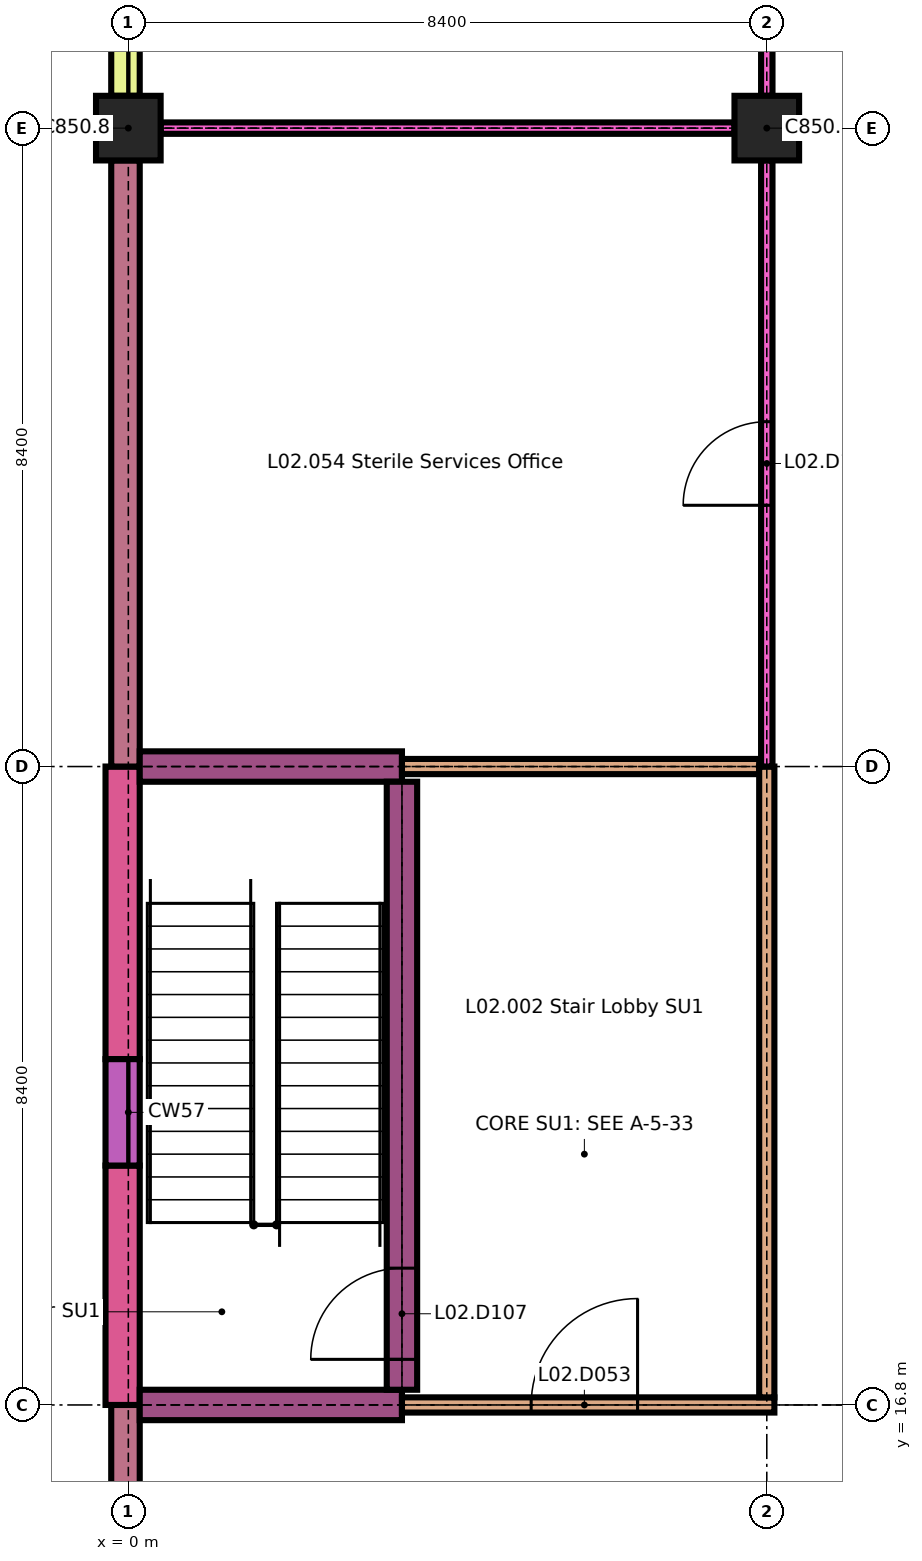
"""IFC4 building model, lengths in metres.
Left out: names, types, materials, properties, quantities, classifications, styles, units other than length and angle.
Written with IfcOpenShell. Run it as: python <this file> out.ifc"""

import sys

from ifc_helpers import new_model, si_unit, direction, frame, frame_2d, origin, origin_2d, place, context, subcontext, project, spatial, rectangle, extrude, element, fill, save


model = new_model("IFC4")
c1 = context("Model", 3, precision=1e-05, world=origin(), true_north=direction((0.0, 1.0)))
c2 = subcontext(c1, "Body", "Model", "MODEL_VIEW")
j1 = project(units=[si_unit("LENGTHUNIT", "METRE"), si_unit("PLANEANGLEUNIT", "RADIAN")], contexts=[c1])
p1 = place(None, origin())
s1 = spatial("IfcSite", under=j1, at=p1, CompositionType="ELEMENT")
p2 = place(p1, origin())
s2 = spatial("IfcBuilding", under=s1, at=p2, CompositionType="ELEMENT")
p3 = place(p2, frame((0.0, 0.0, 8.4)))
s3 = spatial("IfcBuildingStorey", under=s2, at=p3, CompositionType="ELEMENT", Elevation=8.4)
for number, where, z_axis, x_axis in (
    (1, (0.0, 33.6, 0.0), (0.0, 0.0, 1.0), (1.0, 0.0, 0.0)),
    (2, (8.4, 33.6, 0.0), (0.0, 0.0, 1.0), (1.0, 0.0, 0.0)),
):
    element("IfcColumn", number, at=place(p3, frame(where, z_axis=z_axis, x_axis=x_axis)), inside=s3, PredefinedType="COLUMN", context=c2, shape_type="SweptSolid", body=[
        extrude(rectangle(XDim=0.85, YDim=0.85, at=origin_2d()), origin(), (0.0, 0.0, 1.0), 4.2),
    ])
p4 = place(p3, frame((-0.038, 13.8, 0.0), z_axis=(0.0, 0.0, 1.0), x_axis=(0.0, 1.0, 0.0)))
e3 = element("IfcWall", 3, at=p4, inside=s3, PredefinedType="SOLIDWALL", context=c2, shape_type="SweptSolid", body=[
    extrude(rectangle(XDim=3.0, YDim=0.375, at=frame_2d((1.5, 0.0))), origin(), (0.0, 0.0, 1.0), 3.9),
])
p5 = place(p4, frame((0.45, 0.0, 0.9)))
e4 = element("IfcOpeningElement", 4, at=p5, cuts=e3, PredefinedType="OPENING", context=c2, shape_type="SweptSolid", body=[
    extrude(rectangle(XDim=0.9, YDim=2.1, at=frame_2d((0.45, 1.05))), frame((0.0, 0.198, 0.0), z_axis=(0.0, -1.0, 0.0), x_axis=(1.0, 0.0, 0.0)), (0.0, 0.0, 1.0), 0.395),
])
p6 = place(p3, frame((-0.075, 16.8, 0.0), z_axis=(0.0, 0.0, 1.0), x_axis=(0.0, 1.0, 0.0)))
e5 = element("IfcWall", 5, at=p6, inside=s3, PredefinedType="SOLIDWALL", context=c2, shape_type="SweptSolid", body=[
    extrude(rectangle(XDim=3.15, YDim=0.45, at=frame_2d((1.575, 0.0))), origin(), (0.0, 0.0, 1.0), 4.2),
])
p7 = place(p3, frame((-0.075, 21.35, 0.0), z_axis=(0.0, 0.0, 1.0), x_axis=(0.0, 1.0, 0.0)))
e6 = element("IfcWall", 6, at=p7, inside=s3, PredefinedType="SOLIDWALL", context=c2, shape_type="SweptSolid", body=[
    extrude(rectangle(XDim=3.85, YDim=0.45, at=frame_2d((1.925, 0.0))), origin(), (0.0, 0.0, 1.0), 4.2),
])
p8 = place(p3, frame((-0.075, 19.95, 0.0), z_axis=(0.0, 0.0, 1.0), x_axis=(0.0, 1.0, 0.0)))
e7 = element("IfcWall", 7, at=p8, inside=s3, PredefinedType="SOLIDWALL", context=c2, shape_type="SweptSolid", body=[
    extrude(rectangle(XDim=1.4, YDim=0.45, at=frame_2d((0.7, 0.0))), origin(), (0.0, 0.0, 1.0), 0.6),
])
p9 = place(p3, frame((-0.038, 25.2, 0.0), z_axis=(0.0, 0.0, 1.0), x_axis=(0.0, 1.0, 0.0)))
e8 = element("IfcWall", 8, at=p9, inside=s3, PredefinedType="SOLIDWALL", context=c2, shape_type="SweptSolid", body=[
    extrude(rectangle(XDim=7.975, YDim=0.375, at=frame_2d((3.988, 0.0))), origin(), (0.0, 0.0, 1.0), 3.9),
])
p10 = place(p3, frame((-0.038, 34.025, 0.0), z_axis=(0.0, 0.0, 1.0), x_axis=(0.0, 1.0, 0.0)))
e9 = element("IfcWall", 9, at=p10, inside=s3, PredefinedType="SOLIDWALL", context=c2, shape_type="SweptSolid", body=[
    extrude(rectangle(XDim=7.55, YDim=0.375, at=frame_2d((3.775, 0.0))), origin(), (0.0, 0.0, 1.0), 0.45),
])
p11 = place(p3, frame((0.15, 16.8, 0.0), z_axis=(0.0, 0.0, 1.0), x_axis=(1.0, 0.0, 0.0)))
e10 = element("IfcWall", 10, at=p11, inside=s3, PredefinedType="SHEAR", context=c2, shape_type="SweptSolid", body=[
    extrude(rectangle(XDim=3.45, YDim=0.4, at=frame_2d((1.725, 0.0))), origin(), (0.0, 0.0, 1.0), 4.2),
])
p12 = place(p3, frame((3.6, 16.8, 0.0), z_axis=(0.0, 0.0, 1.0), x_axis=(1.0, 0.0, 0.0)))
e11 = element("IfcWall", 11, at=p12, inside=s3, PredefinedType="PARTITIONING", context=c2, shape_type="SweptSolid", body=[
    extrude(rectangle(XDim=4.9, YDim=0.2, at=frame_2d((2.45, 0.0))), origin(), (0.0, 0.0, 1.0), 4.2),
])
p13 = place(p12, frame((1.7, 0.0, 0.0)))
e12 = element("IfcOpeningElement", 12, at=p13, cuts=e11, PredefinedType="OPENING", context=c2, shape_type="SweptSolid", body=[
    extrude(rectangle(XDim=1.4, YDim=2.1, at=frame_2d((0.7, 1.05))), frame((0.0, 0.11, 0.0), z_axis=(0.0, -1.0, 0.0), x_axis=(1.0, 0.0, 0.0)), (0.0, 0.0, 1.0), 0.22),
])
p14 = place(p3, frame((0.15, 25.2, 0.0), z_axis=(0.0, 0.0, 1.0), x_axis=(1.0, 0.0, 0.0)))
e13 = element("IfcWall", 13, at=p14, inside=s3, PredefinedType="SHEAR", context=c2, shape_type="SweptSolid", body=[
    extrude(rectangle(XDim=3.45, YDim=0.4, at=frame_2d((1.725, 0.0))), origin(), (0.0, 0.0, 1.0), 4.2),
])
p15 = place(p3, frame((3.6, 25.2, 0.0), z_axis=(0.0, 0.0, 1.0), x_axis=(1.0, 0.0, 0.0)))
e14 = element("IfcWall", 14, at=p15, inside=s3, PredefinedType="PARTITIONING", context=c2, shape_type="SweptSolid", body=[
    extrude(rectangle(XDim=4.7, YDim=0.2, at=frame_2d((2.35, 0.0))), origin(), (0.0, 0.0, 1.0), 4.2),
])
p16 = place(p3, frame((0.425, 33.6, 0.0), z_axis=(0.0, 0.0, 1.0), x_axis=(1.0, 0.0, 0.0)))
e15 = element("IfcWall", 15, at=p16, inside=s3, PredefinedType="PARTITIONING", context=c2, shape_type="SweptSolid", body=[
    extrude(rectangle(XDim=7.55, YDim=0.15, at=frame_2d((3.775, 0.0))), origin(), (0.0, 0.0, 1.0), 4.2),
])
p17 = place(p3, frame((3.6, 17.0, 0.0), z_axis=(0.0, 0.0, 1.0), x_axis=(0.0, 1.0, 0.0)))
e16 = element("IfcWall", 16, at=p17, inside=s3, PredefinedType="SHEAR", context=c2, shape_type="SweptSolid", body=[
    extrude(rectangle(XDim=8.0, YDim=0.4, at=frame_2d((4.0, 0.0))), origin(), (0.0, 0.0, 1.0), 4.2),
])
p18 = place(p17, frame((0.4, 0.0, 0.0)))
e17 = element("IfcOpeningElement", 17, at=p18, cuts=e16, PredefinedType="OPENING", context=c2, shape_type="SweptSolid", body=[
    extrude(rectangle(XDim=1.2, YDim=2.1, at=frame_2d((0.6, 1.05))), frame((0.0, 0.21, 0.0), z_axis=(0.0, -1.0, 0.0), x_axis=(1.0, 0.0, 0.0)), (0.0, 0.0, 1.0), 0.42),
])
p19 = place(p3, frame((8.4, 16.9, 0.0), z_axis=(0.0, 0.0, 1.0), x_axis=(0.0, 1.0, 0.0)))
e18 = element("IfcWall", 18, at=p19, inside=s3, PredefinedType="PARTITIONING", context=c2, shape_type="SweptSolid", body=[
    extrude(rectangle(XDim=8.3, YDim=0.2, at=frame_2d((4.15, 0.0))), origin(), (0.0, 0.0, 1.0), 4.2),
])
p20 = place(p3, frame((8.4, 25.2, 0.0), z_axis=(0.0, 0.0, 1.0), x_axis=(0.0, 1.0, 0.0)))
e19 = element("IfcWall", 19, at=p20, inside=s3, PredefinedType="PARTITIONING", context=c2, shape_type="SweptSolid", body=[
    extrude(rectangle(XDim=7.975, YDim=0.15, at=frame_2d((3.988, 0.0))), origin(), (0.0, 0.0, 1.0), 4.2),
])
p21 = place(p20, frame((3.438, 0.0, 0.0)))
e20 = element("IfcOpeningElement", 20, at=p21, cuts=e19, PredefinedType="OPENING", context=c2, shape_type="SweptSolid", body=[
    extrude(rectangle(XDim=1.1, YDim=2.1, at=frame_2d((0.55, 1.05))), frame((0.0, 0.085, 0.0), z_axis=(0.0, -1.0, 0.0), x_axis=(1.0, 0.0, 0.0)), (0.0, 0.0, 1.0), 0.17),
])
p22 = place(p3, frame((8.4, 34.025, 0.0), z_axis=(0.0, 0.0, 1.0), x_axis=(0.0, 1.0, 0.0)))
e21 = element("IfcWall", 21, at=p22, inside=s3, PredefinedType="PARTITIONING", context=c2, shape_type="SweptSolid", body=[
    extrude(rectangle(XDim=7.55, YDim=0.15, at=frame_2d((3.775, 0.0))), origin(), (0.0, 0.0, 1.0), 4.2),
])
p23 = place(p22, frame((3.075, 0.0, 0.0)))
e22 = element("IfcOpeningElement", 22, at=p23, cuts=e21, PredefinedType="OPENING", context=c2, shape_type="SweptSolid", body=[
    extrude(rectangle(XDim=1.4, YDim=2.1, at=frame_2d((0.7, 1.05))), frame((0.0, 0.085, 0.0), z_axis=(0.0, -1.0, 0.0), x_axis=(1.0, 0.0, 0.0)), (0.0, 0.0, 1.0), 0.17),
])
p24 = place(p13, origin())
e23 = element("IfcDoor", 23, at=p24, inside=s3, OperationType="SINGLE_SWING_LEFT", PredefinedType="DOOR", context=c2, shape_type="SweptSolid", body=[
    extrude(rectangle(XDim=1.4, YDim=2.1, at=frame_2d((0.7, 1.05))), frame((0.0, 0.03, 0.0), z_axis=(0.0, -1.0, 0.0), x_axis=(1.0, 0.0, 0.0)), (0.0, 0.0, 1.0), 0.06),
])
fill(e12, e23)
p25 = place(p18, origin())
e24 = element("IfcDoor", 24, at=p25, inside=s3, OperationType="SINGLE_SWING_RIGHT", PredefinedType="DOOR", context=c2, shape_type="SweptSolid", body=[
    extrude(rectangle(XDim=1.2, YDim=2.1, at=frame_2d((0.6, 1.05))), frame((0.0, 0.025, 0.0), z_axis=(0.0, -1.0, 0.0), x_axis=(1.0, 0.0, 0.0)), (0.0, 0.0, 1.0), 0.05),
])
fill(e17, e24)
p26 = place(p21, origin())
e25 = element("IfcDoor", 25, at=p26, inside=s3, OperationType="SINGLE_SWING_RIGHT", PredefinedType="DOOR", context=c2, shape_type="SweptSolid", body=[
    extrude(rectangle(XDim=1.1, YDim=2.1, at=frame_2d((0.55, 1.05))), frame((0.0, 0.025, 0.0), z_axis=(0.0, -1.0, 0.0), x_axis=(1.0, 0.0, 0.0)), (0.0, 0.0, 1.0), 0.05),
])
fill(e20, e25)
save(model, sys.argv[1])
